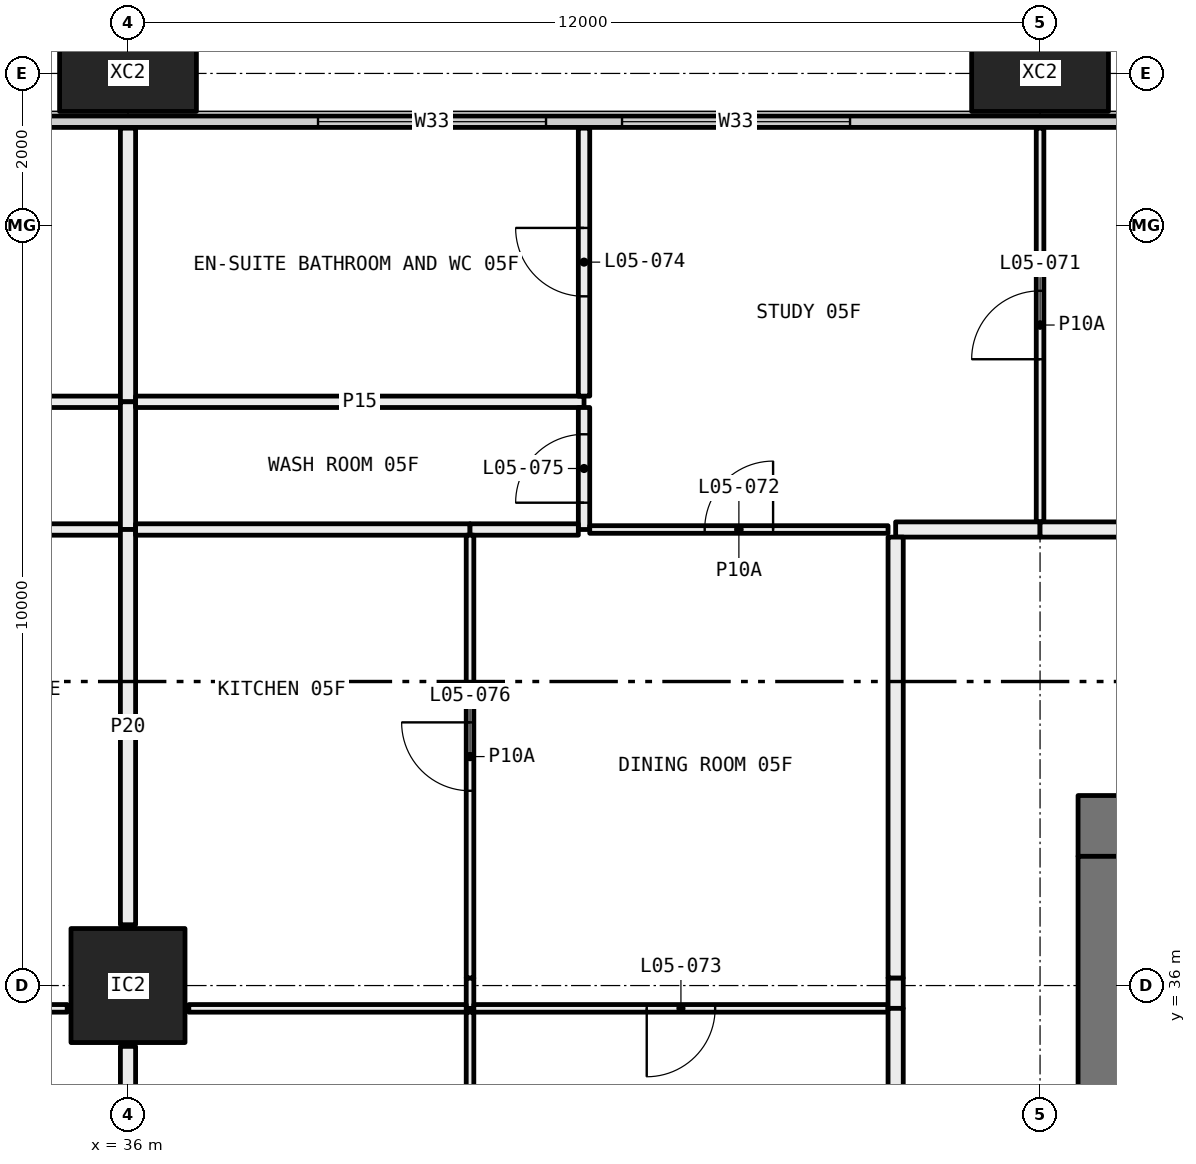
"""IFC4 building model, lengths in metres.
Left out: names, types, materials, properties, quantities, classifications, styles, units other than length and angle.
Written with IfcOpenShell. Run it as: python <this file> out.ifc"""

import sys

from ifc_helpers import new_model, si_unit, direction, frame, frame_2d, origin, origin_2d, place, context, subcontext, project, spatial, rectangle, hollow_rectangle, extrude, element, fill, save


model = new_model("IFC4")
c1 = context("Model", 3, precision=1e-05, world=origin(), true_north=direction((0.0, 1.0)))
c2 = subcontext(c1, "Body", "Model", "MODEL_VIEW")
j1 = project(units=[si_unit("LENGTHUNIT", "METRE"), si_unit("PLANEANGLEUNIT", "RADIAN")], contexts=[c1])
p1 = place(None, origin())
s1 = spatial("IfcSite", under=j1, at=p1, CompositionType="ELEMENT")
p2 = place(p1, origin())
s2 = spatial("IfcBuilding", under=s1, at=p2, CompositionType="ELEMENT")
p3 = place(p2, frame((0.0, 0.0, 30.0)))
s3 = spatial("IfcBuildingStorey", under=s2, at=p3, CompositionType="ELEMENT", Elevation=30.0)
p4 = place(p3, frame((36.0, 36.0, 0.0), z_axis=(0.0, 0.0, 1.0), x_axis=(1.0, 0.0, 0.0)))
e1 = element("IfcColumn", 1, at=p4, inside=s3, PredefinedType="COLUMN", context=c2, shape_type="SweptSolid", body=[
    extrude(hollow_rectangle(XDim=1.5, YDim=1.5, WallThickness=0.065, at=origin_2d()), origin(), (0.0, 0.0, 1.0), 3.05),
])
for number, where, z_axis, x_axis in (
    (2, (36.0, 48.0, -0.4), (0.0, 0.0, 1.0), (1.0, 0.0, 0.0)),
    (3, (48.0, 48.0, -0.4), (0.0, 0.0, 1.0), (1.0, 0.0, 0.0)),
):
    element("IfcColumn", number, at=place(p3, frame(where, z_axis=z_axis, x_axis=x_axis)), inside=s3, PredefinedType="COLUMN", context=c2, shape_type="SweptSolid", body=[
        extrude(hollow_rectangle(XDim=1.8, YDim=1.0, WallThickness=0.07, at=origin_2d()), origin(), (0.0, 0.0, 1.0), 3.45),
    ])
p5 = place(p3, frame((6.56, 47.365, 0.0), z_axis=(0.0, 0.0, 1.0), x_axis=(1.0, 0.0, 0.0)))
e4 = element("IfcWall", 4, at=p5, inside=s3, PredefinedType="ELEMENTEDWALL", context=c2, shape_type="SweptSolid", body=[
    extrude(rectangle(XDim=58.88, YDim=0.15, at=frame_2d((29.44, 0.0))), origin(), (0.0, 0.0, 1.0), 3.05),
])
p6 = place(p5, frame((0.44, 0.0, 0.45)))
e5 = element("IfcOpeningElement", 5, at=p6, cuts=e4, PredefinedType="OPENING", context=c2, shape_type="SweptSolid", body=[
    extrude(rectangle(XDim=4.5, YDim=2.55, at=frame_2d((2.25, 1.275))), frame((0.0, 0.085, 0.0), z_axis=(0.0, -1.0, 0.0), x_axis=(1.0, 0.0, 0.0)), (0.0, 0.0, 1.0), 0.17),
])
p7 = place(p5, frame((7.94, 0.0, 0.45)))
e6 = element("IfcOpeningElement", 6, at=p7, cuts=e4, PredefinedType="OPENING", context=c2, shape_type="SweptSolid", body=[
    extrude(rectangle(XDim=3.0, YDim=2.55, at=frame_2d((1.5, 1.275))), frame((0.0, 0.085, 0.0), z_axis=(0.0, -1.0, 0.0), x_axis=(1.0, 0.0, 0.0)), (0.0, 0.0, 1.0), 0.17),
])
p8 = place(p5, frame((11.94, 0.0, 0.45)))
e7 = element("IfcOpeningElement", 7, at=p8, cuts=e4, PredefinedType="OPENING", context=c2, shape_type="SweptSolid", body=[
    extrude(rectangle(XDim=3.0, YDim=2.55, at=frame_2d((1.5, 1.275))), frame((0.0, 0.085, 0.0), z_axis=(0.0, -1.0, 0.0), x_axis=(1.0, 0.0, 0.0)), (0.0, 0.0, 1.0), 0.17),
])
p9 = place(p5, frame((19.94, 0.0, 0.45)))
e8 = element("IfcOpeningElement", 8, at=p9, cuts=e4, PredefinedType="OPENING", context=c2, shape_type="SweptSolid", body=[
    extrude(rectangle(XDim=3.0, YDim=2.55, at=frame_2d((1.5, 1.275))), frame((0.0, 0.085, 0.0), z_axis=(0.0, -1.0, 0.0), x_axis=(1.0, 0.0, 0.0)), (0.0, 0.0, 1.0), 0.17),
])
p10 = place(p5, frame((23.94, 0.0, 0.45)))
e9 = element("IfcOpeningElement", 9, at=p10, cuts=e4, PredefinedType="OPENING", context=c2, shape_type="SweptSolid", body=[
    extrude(rectangle(XDim=2.0, YDim=2.55, at=frame_2d((1.0, 1.275))), frame((0.0, 0.085, 0.0), z_axis=(0.0, -1.0, 0.0), x_axis=(1.0, 0.0, 0.0)), (0.0, 0.0, 1.0), 0.17),
])
p11 = place(p5, frame((31.94, 0.0, 0.45)))
e10 = element("IfcOpeningElement", 10, at=p11, cuts=e4, PredefinedType="OPENING", context=c2, shape_type="SweptSolid", body=[
    extrude(rectangle(XDim=3.0, YDim=2.55, at=frame_2d((1.5, 1.275))), frame((0.0, 0.085, 0.0), z_axis=(0.0, -1.0, 0.0), x_axis=(1.0, 0.0, 0.0)), (0.0, 0.0, 1.0), 0.17),
])
p12 = place(p5, frame((35.94, 0.0, 0.45)))
e11 = element("IfcOpeningElement", 11, at=p12, cuts=e4, PredefinedType="OPENING", context=c2, shape_type="SweptSolid", body=[
    extrude(rectangle(XDim=3.0, YDim=2.55, at=frame_2d((1.5, 1.275))), frame((0.0, 0.085, 0.0), z_axis=(0.0, -1.0, 0.0), x_axis=(1.0, 0.0, 0.0)), (0.0, 0.0, 1.0), 0.17),
])
p13 = place(p5, frame((43.94, 0.0, 0.45)))
e12 = element("IfcOpeningElement", 12, at=p13, cuts=e4, PredefinedType="OPENING", context=c2, shape_type="SweptSolid", body=[
    extrude(rectangle(XDim=3.0, YDim=2.55, at=frame_2d((1.5, 1.275))), frame((0.0, 0.085, 0.0), z_axis=(0.0, -1.0, 0.0), x_axis=(1.0, 0.0, 0.0)), (0.0, 0.0, 1.0), 0.17),
])
p14 = place(p5, frame((47.94, 0.0, 0.45)))
e13 = element("IfcOpeningElement", 13, at=p14, cuts=e4, PredefinedType="OPENING", context=c2, shape_type="SweptSolid", body=[
    extrude(rectangle(XDim=2.0, YDim=2.55, at=frame_2d((1.0, 1.275))), frame((0.0, 0.085, 0.0), z_axis=(0.0, -1.0, 0.0), x_axis=(1.0, 0.0, 0.0)), (0.0, 0.0, 1.0), 0.17),
])
p15 = place(p5, frame((53.94, 0.0, 0.45)))
e14 = element("IfcOpeningElement", 14, at=p15, cuts=e4, PredefinedType="OPENING", context=c2, shape_type="SweptSolid", body=[
    extrude(rectangle(XDim=4.5, YDim=2.55, at=frame_2d((2.25, 1.275))), frame((0.0, 0.085, 0.0), z_axis=(0.0, -1.0, 0.0), x_axis=(1.0, 0.0, 0.0)), (0.0, 0.0, 1.0), 0.17),
])
p16 = place(p3, frame((30.075, 43.68, 0.0), z_axis=(0.0, 0.0, 1.0), x_axis=(1.0, 0.0, 0.0)))
e15 = element("IfcWall", 15, at=p16, inside=s3, PredefinedType="PARTITIONING", context=c2, shape_type="SweptSolid", body=[
    extrude(rectangle(XDim=5.825, YDim=0.15, at=frame_2d((2.913, 0.0))), origin(), (0.0, 0.0, 1.0), 3.05),
])
p17 = place(p3, frame((36.0, 43.68, 0.0), z_axis=(0.0, 0.0, 1.0), x_axis=(0.0, 1.0, 0.0)))
e16 = element("IfcWall", 16, at=p17, inside=s3, PredefinedType="PARTITIONING", context=c2, shape_type="SweptSolid", body=[
    extrude(rectangle(XDim=3.6, YDim=0.2, at=frame_2d((1.8, 0.0))), origin(), (0.0, 0.0, 1.0), 2.45),
])
p18 = place(p3, frame((31.5, 42.0, 0.0), z_axis=(0.0, 0.0, 1.0), x_axis=(1.0, 0.0, 0.0)))
e17 = element("IfcWall", 17, at=p18, inside=s3, PredefinedType="PARTITIONING", context=c2, shape_type="SweptSolid", body=[
    extrude(rectangle(XDim=4.4, YDim=0.15, at=frame_2d((2.2, 0.0))), origin(), (0.0, 0.0, 1.0), 3.05),
])
p19 = place(p3, frame((36.0, 42.0, 0.0), z_axis=(0.0, 0.0, 1.0), x_axis=(0.0, 1.0, 0.0)))
e18 = element("IfcWall", 18, at=p19, inside=s3, PredefinedType="PARTITIONING", context=c2, shape_type="SweptSolid", body=[
    extrude(rectangle(XDim=1.68, YDim=0.2, at=frame_2d((0.84, 0.0))), origin(), (0.0, 0.0, 1.0), 2.45),
])
p20 = place(p3, frame((31.55, 35.7, 0.0), z_axis=(0.0, 0.0, 1.0), x_axis=(1.0, 0.0, 0.0)))
e19 = element("IfcWall", 19, at=p20, inside=s3, PredefinedType="PARTITIONING", context=c2, shape_type="SweptSolid", body=[
    extrude(rectangle(XDim=3.65, YDim=0.1, at=frame_2d((1.825, 0.0))), origin(), (0.0, 0.0, 1.0), 3.05),
])
p21 = place(p20, frame((1.375, 0.0, 0.0)))
e20 = element("IfcOpeningElement", 20, at=p21, cuts=e19, PredefinedType="OPENING", context=c2, shape_type="SweptSolid", body=[
    extrude(rectangle(XDim=0.9, YDim=2.1, at=frame_2d((0.45, 1.05))), frame((0.0, 0.06, 0.0), z_axis=(0.0, -1.0, 0.0), x_axis=(1.0, 0.0, 0.0)), (0.0, 0.0, 1.0), 0.12),
])
p22 = place(p3, frame((36.0, 36.8, 0.0), z_axis=(0.0, 0.0, 1.0), x_axis=(0.0, 1.0, 0.0)))
e21 = element("IfcWall", 21, at=p22, inside=s3, PredefinedType="PARTITIONING", context=c2, shape_type="SweptSolid", body=[
    extrude(rectangle(XDim=5.2, YDim=0.2, at=frame_2d((2.6, 0.0))), origin(), (0.0, 0.0, 1.0), 2.45),
])
p23 = place(p3, frame((36.0, 31.2, 0.0), z_axis=(0.0, 0.0, 1.0), x_axis=(0.0, 1.0, 0.0)))
e22 = element("IfcWall", 22, at=p23, inside=s3, PredefinedType="PARTITIONING", context=c2, shape_type="SweptSolid", body=[
    extrude(rectangle(XDim=4.0, YDim=0.2, at=frame_2d((2.0, 0.0))), origin(), (0.0, 0.0, 1.0), 2.45),
])
p24 = place(p3, frame((36.1, 43.68, 0.0), z_axis=(0.0, 0.0, 1.0), x_axis=(1.0, 0.0, 0.0)))
e23 = element("IfcWall", 23, at=p24, inside=s3, PredefinedType="PARTITIONING", context=c2, shape_type="SweptSolid", body=[
    extrude(rectangle(XDim=5.9, YDim=0.15, at=frame_2d((2.95, 0.0))), origin(), (0.0, 0.0, 1.0), 3.05),
])
p25 = place(p3, frame((42.0, 43.755, 0.0), z_axis=(0.0, 0.0, 1.0), x_axis=(0.0, 1.0, 0.0)))
e24 = element("IfcWall", 24, at=p25, inside=s3, PredefinedType="PARTITIONING", context=c2, shape_type="SweptSolid", body=[
    extrude(rectangle(XDim=3.525, YDim=0.15, at=frame_2d((1.763, 0.0))), origin(), (0.0, 0.0, 1.0), 3.05),
])
p26 = place(p25, frame((1.312, 0.0, 0.0)))
e25 = element("IfcOpeningElement", 25, at=p26, cuts=e24, PredefinedType="OPENING", context=c2, shape_type="SweptSolid", body=[
    extrude(rectangle(XDim=0.9, YDim=2.1, at=frame_2d((0.45, 1.05))), frame((0.0, 0.085, 0.0), z_axis=(0.0, -1.0, 0.0), x_axis=(1.0, 0.0, 0.0)), (0.0, 0.0, 1.0), 0.17),
])
p27 = place(p3, frame((42.0, 42.0, 0.0), z_axis=(0.0, 0.0, 1.0), x_axis=(0.0, 1.0, 0.0)))
e26 = element("IfcWall", 26, at=p27, inside=s3, PredefinedType="PARTITIONING", context=c2, shape_type="SweptSolid", body=[
    extrude(rectangle(XDim=1.605, YDim=0.15, at=frame_2d((0.802, 0.0))), origin(), (0.0, 0.0, 1.0), 3.05),
])
p28 = place(p27, frame((0.353, 0.0, 0.0)))
e27 = element("IfcOpeningElement", 27, at=p28, cuts=e26, PredefinedType="OPENING", context=c2, shape_type="SweptSolid", body=[
    extrude(rectangle(XDim=0.9, YDim=2.1, at=frame_2d((0.45, 1.05))), frame((0.0, 0.085, 0.0), z_axis=(0.0, -1.0, 0.0), x_axis=(1.0, 0.0, 0.0)), (0.0, 0.0, 1.0), 0.17),
])
p29 = place(p3, frame((36.1, 42.0, 0.0), z_axis=(0.0, 0.0, 1.0), x_axis=(1.0, 0.0, 0.0)))
e28 = element("IfcWall", 28, at=p29, inside=s3, PredefinedType="PARTITIONING", context=c2, shape_type="SweptSolid", body=[
    extrude(rectangle(XDim=4.4, YDim=0.15, at=frame_2d((2.2, 0.0))), origin(), (0.0, 0.0, 1.0), 3.05),
])
p30 = place(p3, frame((40.5, 42.0, 0.0), z_axis=(0.0, 0.0, 1.0), x_axis=(1.0, 0.0, 0.0)))
e29 = element("IfcWall", 29, at=p30, inside=s3, PredefinedType="PARTITIONING", context=c2, shape_type="SweptSolid", body=[
    extrude(rectangle(XDim=1.425, YDim=0.15, at=frame_2d((0.712, 0.0))), origin(), (0.0, 0.0, 1.0), 3.05),
])
p31 = place(p3, frame((48.0, 42.1, 0.0), z_axis=(0.0, 0.0, 1.0), x_axis=(0.0, 1.0, 0.0)))
e30 = element("IfcWall", 30, at=p31, inside=s3, PredefinedType="PARTITIONING", context=c2, shape_type="SweptSolid", body=[
    extrude(rectangle(XDim=5.18, YDim=0.1, at=frame_2d((2.59, 0.0))), origin(), (0.0, 0.0, 1.0), 3.05),
])
p32 = place(p31, frame((2.14, 0.0, 0.0)))
e31 = element("IfcOpeningElement", 31, at=p32, cuts=e30, PredefinedType="OPENING", context=c2, shape_type="SweptSolid", body=[
    extrude(rectangle(XDim=0.9, YDim=2.1, at=frame_2d((0.45, 1.05))), frame((0.0, 0.06, 0.0), z_axis=(0.0, -1.0, 0.0), x_axis=(1.0, 0.0, 0.0)), (0.0, 0.0, 1.0), 0.12),
])
p33 = place(p3, frame((42.075, 42.0, 0.0), z_axis=(0.0, 0.0, 1.0), x_axis=(1.0, 0.0, 0.0)))
e32 = element("IfcWall", 32, at=p33, inside=s3, PredefinedType="PARTITIONING", context=c2, shape_type="SweptSolid", body=[
    extrude(rectangle(XDim=3.925, YDim=0.1, at=frame_2d((1.962, 0.0))), origin(), (0.0, 0.0, 1.0), 3.05),
])
p34 = place(p33, frame((1.512, 0.0, 0.0)))
e33 = element("IfcOpeningElement", 33, at=p34, cuts=e32, PredefinedType="OPENING", context=c2, shape_type="SweptSolid", body=[
    extrude(rectangle(XDim=0.9, YDim=2.1, at=frame_2d((0.45, 1.05))), frame((0.0, 0.06, 0.0), z_axis=(0.0, -1.0, 0.0), x_axis=(1.0, 0.0, 0.0)), (0.0, 0.0, 1.0), 0.12),
])
p35 = place(p3, frame((46.1, 42.0, 0.0), z_axis=(0.0, 0.0, 1.0), x_axis=(1.0, 0.0, 0.0)))
e34 = element("IfcWall", 34, at=p35, inside=s3, PredefinedType="PARTITIONING", context=c2, shape_type="SweptSolid", body=[
    extrude(rectangle(XDim=1.9, YDim=0.2, at=frame_2d((0.95, 0.0))), origin(), (0.0, 0.0, 1.0), 3.05),
])
p36 = place(p3, frame((48.0, 42.0, 0.0), z_axis=(0.0, 0.0, 1.0), x_axis=(1.0, 0.0, 0.0)))
e35 = element("IfcWall", 35, at=p36, inside=s3, PredefinedType="PARTITIONING", context=c2, shape_type="SweptSolid", body=[
    extrude(rectangle(XDim=6.0, YDim=0.2, at=frame_2d((3.0, 0.0))), origin(), (0.0, 0.0, 1.0), 3.05),
])
p37 = place(p3, frame((40.5, 35.7, 0.0), z_axis=(0.0, 0.0, 1.0), x_axis=(0.0, 1.0, 0.0)))
e36 = element("IfcWall", 36, at=p37, inside=s3, PredefinedType="PARTITIONING", context=c2, shape_type="SweptSolid", body=[
    extrude(rectangle(XDim=0.4, YDim=0.1, at=frame_2d((0.2, 0.0))), origin(), (0.0, 0.0, 1.0), 2.45),
])
p38 = place(p3, frame((40.5, 36.1, 0.0), z_axis=(0.0, 0.0, 1.0), x_axis=(0.0, 1.0, 0.0)))
e37 = element("IfcWall", 37, at=p38, inside=s3, PredefinedType="PARTITIONING", context=c2, shape_type="SweptSolid", body=[
    extrude(rectangle(XDim=5.825, YDim=0.1, at=frame_2d((2.913, 0.0))), origin(), (0.0, 0.0, 1.0), 3.05),
])
p39 = place(p38, frame((2.462, 0.0, 0.0)))
e38 = element("IfcOpeningElement", 38, at=p39, cuts=e37, PredefinedType="OPENING", context=c2, shape_type="SweptSolid", body=[
    extrude(rectangle(XDim=0.9, YDim=2.1, at=frame_2d((0.45, 1.05))), frame((0.0, 0.06, 0.0), z_axis=(0.0, -1.0, 0.0), x_axis=(1.0, 0.0, 0.0)), (0.0, 0.0, 1.0), 0.12),
])
p40 = place(p3, frame((36.8, 35.7, 0.0), z_axis=(0.0, 0.0, 1.0), x_axis=(1.0, 0.0, 0.0)))
e39 = element("IfcWall", 39, at=p40, inside=s3, PredefinedType="PARTITIONING", context=c2, shape_type="SweptSolid", body=[
    extrude(rectangle(XDim=3.65, YDim=0.1, at=frame_2d((1.825, 0.0))), origin(), (0.0, 0.0, 1.0), 3.05),
])
p41 = place(p3, frame((40.55, 35.7, 0.0), z_axis=(0.0, 0.0, 1.0), x_axis=(1.0, 0.0, 0.0)))
e40 = element("IfcWall", 40, at=p41, inside=s3, PredefinedType="PARTITIONING", context=c2, shape_type="SweptSolid", body=[
    extrude(rectangle(XDim=5.45, YDim=0.1, at=frame_2d((2.725, 0.0))), origin(), (0.0, 0.0, 1.0), 3.05),
])
p42 = place(p41, frame((2.275, 0.0, 0.0)))
e41 = element("IfcOpeningElement", 41, at=p42, cuts=e40, PredefinedType="OPENING", context=c2, shape_type="SweptSolid", body=[
    extrude(rectangle(XDim=0.9, YDim=2.1, at=frame_2d((0.45, 1.05))), frame((0.0, 0.06, 0.0), z_axis=(0.0, -1.0, 0.0), x_axis=(1.0, 0.0, 0.0)), (0.0, 0.0, 1.0), 0.12),
])
p43 = place(p3, frame((46.1, 35.7, 0.0), z_axis=(0.0, 0.0, 1.0), x_axis=(0.0, 1.0, 0.0)))
e42 = element("IfcWall", 42, at=p43, inside=s3, PredefinedType="PARTITIONING", context=c2, shape_type="SweptSolid", body=[
    extrude(rectangle(XDim=0.4, YDim=0.2, at=frame_2d((0.2, 0.0))), origin(), (0.0, 0.0, 1.0), 2.45),
])
p44 = place(p3, frame((46.1, 36.1, 0.0), z_axis=(0.0, 0.0, 1.0), x_axis=(0.0, 1.0, 0.0)))
e43 = element("IfcWall", 43, at=p44, inside=s3, PredefinedType="PARTITIONING", context=c2, shape_type="SweptSolid", body=[
    extrude(rectangle(XDim=5.8, YDim=0.2, at=frame_2d((2.9, 0.0))), origin(), (0.0, 0.0, 1.0), 3.05),
])
p45 = place(p3, frame((40.5, 31.3, 0.0), z_axis=(0.0, 0.0, 1.0), x_axis=(0.0, 1.0, 0.0)))
e44 = element("IfcWall", 44, at=p45, inside=s3, PredefinedType="PARTITIONING", context=c2, shape_type="SweptSolid", body=[
    extrude(rectangle(XDim=4.35, YDim=0.1, at=frame_2d((2.175, 0.0))), origin(), (0.0, 0.0, 1.0), 3.05),
])
p46 = place(p45, frame((1.725, 0.0, 0.0)))
e45 = element("IfcOpeningElement", 45, at=p46, cuts=e44, PredefinedType="OPENING", context=c2, shape_type="SweptSolid", body=[
    extrude(rectangle(XDim=0.9, YDim=2.1, at=frame_2d((0.45, 1.05))), frame((0.0, 0.06, 0.0), z_axis=(0.0, -1.0, 0.0), x_axis=(1.0, 0.0, 0.0)), (0.0, 0.0, 1.0), 0.12),
])
p47 = place(p3, frame((46.1, 31.3, 0.0), z_axis=(0.0, 0.0, 1.0), x_axis=(0.0, 1.0, 0.0)))
e46 = element("IfcWall", 46, at=p47, inside=s3, PredefinedType="PARTITIONING", context=c2, shape_type="SweptSolid", body=[
    extrude(rectangle(XDim=4.4, YDim=0.2, at=frame_2d((2.2, 0.0))), origin(), (0.0, 0.0, 1.0), 3.05),
])
p48 = place(p3, frame((59.5, 38.1, 0.0), z_axis=(0.0, 0.0, 1.0), x_axis=(-1.0, 0.0, 0.0)))
e47 = element("IfcWall", 47, at=p48, inside=s3, PredefinedType="SHEAR", context=c2, shape_type="SweptSolid", body=[
    extrude(rectangle(XDim=11.0, YDim=0.8, at=frame_2d((5.5, 0.0))), origin(), (0.0, 0.0, 1.0), 3.05),
])
p49 = place(p48, frame((8.4, 0.0, 0.0)))
e48 = element("IfcOpeningElement", 48, at=p49, cuts=e47, PredefinedType="OPENING", context=c2, shape_type="SweptSolid", body=[
    extrude(rectangle(XDim=1.6, YDim=2.1, at=frame_2d((0.8, 1.05))), frame((0.0, 0.41, 0.0), z_axis=(0.0, -1.0, 0.0), x_axis=(1.0, 0.0, 0.0)), (0.0, 0.0, 1.0), 0.82),
])
p50 = place(p3, frame((48.9, 22.3, 0.0), z_axis=(0.0, 0.0, 1.0), x_axis=(0.0, 1.0, 0.0)))
e49 = element("IfcWall", 49, at=p50, inside=s3, PredefinedType="SHEAR", context=c2, shape_type="SweptSolid", body=[
    extrude(rectangle(XDim=15.4, YDim=0.8, at=frame_2d((7.7, 0.0))), origin(), (0.0, 0.0, 1.0), 3.05),
])
p51 = place(p50, frame((6.9, 0.0, 0.0)))
e50 = element("IfcOpeningElement", 50, at=p51, cuts=e49, PredefinedType="OPENING", context=c2, shape_type="SweptSolid", body=[
    extrude(rectangle(XDim=1.6, YDim=2.1, at=frame_2d((0.8, 1.05))), frame((0.0, 0.41, 0.0), z_axis=(0.0, -1.0, 0.0), x_axis=(1.0, 0.0, 0.0)), (0.0, 0.0, 1.0), 0.82),
])
p52 = place(p11, origin())
e51 = element("IfcWindow", 51, at=p52, inside=s3, PartitioningType="SINGLE_PANEL", PredefinedType="WINDOW", context=c2, shape_type="SweptSolid", body=[
    extrude(rectangle(XDim=3.0, YDim=2.55, at=frame_2d((1.5, 1.275))), frame((0.0, 0.03, 0.0), z_axis=(0.0, -1.0, 0.0), x_axis=(1.0, 0.0, 0.0)), (0.0, 0.0, 1.0), 0.06),
])
fill(e10, e51)
p53 = place(p12, origin())
e52 = element("IfcWindow", 52, at=p53, inside=s3, PartitioningType="SINGLE_PANEL", PredefinedType="WINDOW", context=c2, shape_type="SweptSolid", body=[
    extrude(rectangle(XDim=3.0, YDim=2.55, at=frame_2d((1.5, 1.275))), frame((0.0, 0.03, 0.0), z_axis=(0.0, -1.0, 0.0), x_axis=(1.0, 0.0, 0.0)), (0.0, 0.0, 1.0), 0.06),
])
fill(e11, e52)
p54 = place(p32, origin())
e53 = element("IfcDoor", 53, at=p54, inside=s3, OperationType="SINGLE_SWING_RIGHT", PredefinedType="DOOR", context=c2, shape_type="SweptSolid", body=[
    extrude(rectangle(XDim=0.9, YDim=2.1, at=frame_2d((0.45, 1.05))), frame((0.0, 0.025, 0.0), z_axis=(0.0, -1.0, 0.0), x_axis=(1.0, 0.0, 0.0)), (0.0, 0.0, 1.0), 0.05),
])
fill(e31, e53)
p55 = place(p34, origin())
e54 = element("IfcDoor", 54, at=p55, inside=s3, OperationType="SINGLE_SWING_LEFT", PredefinedType="DOOR", context=c2, shape_type="SweptSolid", body=[
    extrude(rectangle(XDim=0.9, YDim=2.1, at=frame_2d((0.45, 1.05))), frame((0.0, 0.025, 0.0), z_axis=(0.0, -1.0, 0.0), x_axis=(1.0, 0.0, 0.0)), (0.0, 0.0, 1.0), 0.05),
])
fill(e33, e54)
p56 = place(p42, frame((0.9, 0.0, 0.0), x_axis=(-1.0, 0.0, 0.0)))
e55 = element("IfcDoor", 55, at=p56, inside=s3, OperationType="SINGLE_SWING_LEFT", PredefinedType="DOOR", context=c2, shape_type="SweptSolid", body=[
    extrude(rectangle(XDim=0.9, YDim=2.1, at=frame_2d((0.45, 1.05))), frame((0.0, 0.025, 0.0), z_axis=(0.0, -1.0, 0.0), x_axis=(1.0, 0.0, 0.0)), (0.0, 0.0, 1.0), 0.05),
])
fill(e41, e55)
p57 = place(p26, origin())
e56 = element("IfcDoor", 56, at=p57, inside=s3, OperationType="SINGLE_SWING_LEFT", PredefinedType="DOOR", context=c2, shape_type="SweptSolid", body=[
    extrude(rectangle(XDim=0.9, YDim=2.1, at=frame_2d((0.45, 1.05))), frame((0.0, 0.025, 0.0), z_axis=(0.0, -1.0, 0.0), x_axis=(1.0, 0.0, 0.0)), (0.0, 0.0, 1.0), 0.05),
])
fill(e25, e56)
p58 = place(p28, origin())
e57 = element("IfcDoor", 57, at=p58, inside=s3, OperationType="SINGLE_SWING_RIGHT", PredefinedType="DOOR", context=c2, shape_type="SweptSolid", body=[
    extrude(rectangle(XDim=0.9, YDim=2.1, at=frame_2d((0.45, 1.05))), frame((0.0, 0.025, 0.0), z_axis=(0.0, -1.0, 0.0), x_axis=(1.0, 0.0, 0.0)), (0.0, 0.0, 1.0), 0.05),
])
fill(e27, e57)
p59 = place(p39, origin())
e58 = element("IfcDoor", 58, at=p59, inside=s3, OperationType="SINGLE_SWING_LEFT", PredefinedType="DOOR", context=c2, shape_type="SweptSolid", body=[
    extrude(rectangle(XDim=0.9, YDim=2.1, at=frame_2d((0.45, 1.05))), frame((0.0, 0.025, 0.0), z_axis=(0.0, -1.0, 0.0), x_axis=(1.0, 0.0, 0.0)), (0.0, 0.0, 1.0), 0.05),
])
fill(e38, e58)
save(model, sys.argv[1])
